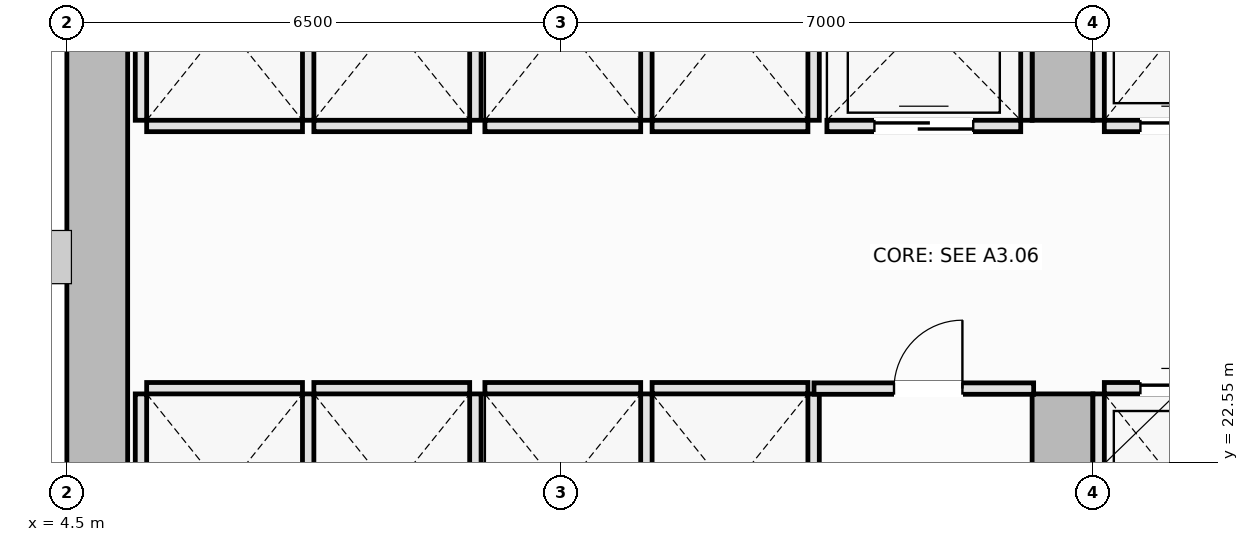
"""IFC4 building model, lengths in metres.
Left out: names, types, materials, properties, quantities, classifications, styles, units other than length and angle.
Written with IfcOpenShell. Run it as: python <this file> out.ifc"""

import sys

from ifc_helpers import new_model, si_unit, direction, frame, frame_2d, origin, place, context, subcontext, project, spatial, rectangle, extrude, element, fill, save


model = new_model("IFC4")
c1 = context("Model", 3, precision=1e-05, world=origin(), true_north=direction((0.0, 1.0)))
c2 = subcontext(c1, "Body", "Model", "MODEL_VIEW")
j1 = project(units=[si_unit("LENGTHUNIT", "METRE"), si_unit("PLANEANGLEUNIT", "RADIAN")], contexts=[c1])
p1 = place(None, origin())
s1 = spatial("IfcSite", under=j1, at=p1, CompositionType="ELEMENT")
p2 = place(p1, origin())
s2 = spatial("IfcBuilding", under=s1, at=p2, CompositionType="ELEMENT")
p3 = place(p2, frame((0.0, 0.0, 61.1)))
s3 = spatial("IfcBuildingStorey", under=s2, at=p3, CompositionType="ELEMENT", Elevation=61.1)
p4 = place(p3, frame((4.9, 14.8, 0.0), z_axis=(0.0, 0.0, 1.0), x_axis=(0.0, 1.0, 0.0)))
e1 = element("IfcWall", 1, at=p4, inside=s3, PredefinedType="SHEAR", context=c2, shape_type="SweptSolid", body=[
    extrude(rectangle(XDim=20.9, YDim=0.8, at=frame_2d((10.45, 0.0))), origin(), (0.0, 0.0, 1.0), 3.55),
])
p5 = place(p3, frame((17.6, 14.8, 0.0), z_axis=(0.0, 0.0, 1.0), x_axis=(0.0, 1.0, 0.0)))
e2 = element("IfcWall", 2, at=p5, inside=s3, PredefinedType="SHEAR", context=c2, shape_type="SweptSolid", body=[
    extrude(rectangle(XDim=8.65, YDim=0.8, at=frame_2d((4.325, 0.0))), origin(), (0.0, 0.0, 1.0), 3.55),
])
p6 = place(p5, frame((4.1, 0.0, 0.0)))
e3 = element("IfcOpeningElement", 3, at=p6, cuts=e2, PredefinedType="OPENING", context=c2, shape_type="SweptSolid", body=[
    extrude(rectangle(XDim=1.1, YDim=2.15, at=frame_2d((0.55, 1.075))), frame((0.0, 0.41, 0.0), z_axis=(0.0, -1.0, 0.0), x_axis=(1.0, 0.0, 0.0)), (0.0, 0.0, 1.0), 0.82),
])
p7 = place(p3, frame((17.6, 27.05, 0.0), z_axis=(0.0, 0.0, 1.0), x_axis=(0.0, 1.0, 0.0)))
e4 = element("IfcWall", 4, at=p7, inside=s3, PredefinedType="SHEAR", context=c2, shape_type="SweptSolid", body=[
    extrude(rectangle(XDim=8.65, YDim=0.8, at=frame_2d((4.325, 0.0))), origin(), (0.0, 0.0, 1.0), 3.55),
])
p8 = place(p7, frame((3.45, 0.0, 0.0)))
e5 = element("IfcOpeningElement", 5, at=p8, cuts=e4, PredefinedType="OPENING", context=c2, shape_type="SweptSolid", body=[
    extrude(rectangle(XDim=1.1, YDim=2.15, at=frame_2d((0.55, 1.075))), frame((0.0, 0.41, 0.0), z_axis=(0.0, -1.0, 0.0), x_axis=(1.0, 0.0, 0.0)), (0.0, 0.0, 1.0), 0.82),
])
p9 = place(p3, frame((18.15, 23.525, 0.0), z_axis=(0.0, 0.0, 1.0), x_axis=(1.0, 0.0, 0.0)))
e6 = element("IfcWall", 6, at=p9, inside=s3, PredefinedType="PARTITIONING", context=c2, shape_type="SweptSolid", body=[
    extrude(rectangle(XDim=2.05, YDim=0.15, at=frame_2d((1.025, 0.0))), origin(), (0.0, 0.0, 1.0), 3.37),
])
p10 = place(p9, frame((0.475, 0.0, 0.0)))
e7 = element("IfcOpeningElement", 7, at=p10, cuts=e6, PredefinedType="OPENING", context=c2, shape_type="SweptSolid", body=[
    extrude(rectangle(XDim=1.1, YDim=2.2, at=frame_2d((0.55, 1.1))), frame((0.0, 0.085, 0.0), z_axis=(0.0, -1.0, 0.0), x_axis=(1.0, 0.0, 0.0)), (0.0, 0.0, 1.0), 0.17),
])
p11 = place(p3, frame((18.075, 20.9, 0.0), z_axis=(0.0, 0.0, 1.0), x_axis=(0.0, 1.0, 0.0)))
e8 = element("IfcWall", 8, at=p11, inside=s3, PredefinedType="PARTITIONING", context=c2, shape_type="SweptSolid", body=[
    extrude(rectangle(XDim=2.55, YDim=0.15, at=frame_2d((1.275, 0.0))), origin(), (0.0, 0.0, 1.0), 3.37),
])
p12 = place(p3, frame((18.15, 26.975, 0.0), z_axis=(0.0, 0.0, 1.0), x_axis=(1.0, 0.0, 0.0)))
e9 = element("IfcWall", 9, at=p12, inside=s3, PredefinedType="PARTITIONING", context=c2, shape_type="SweptSolid", body=[
    extrude(rectangle(XDim=2.05, YDim=0.15, at=frame_2d((1.025, 0.0))), origin(), (0.0, 0.0, 1.0), 3.37),
])
p13 = place(p12, frame((0.475, 0.0, 0.0)))
e10 = element("IfcOpeningElement", 10, at=p13, cuts=e9, PredefinedType="OPENING", context=c2, shape_type="SweptSolid", body=[
    extrude(rectangle(XDim=1.1, YDim=2.2, at=frame_2d((0.55, 1.1))), frame((0.0, 0.085, 0.0), z_axis=(0.0, -1.0, 0.0), x_axis=(1.0, 0.0, 0.0)), (0.0, 0.0, 1.0), 0.17),
])
p14 = place(p3, frame((18.075, 27.05, 0.0), z_axis=(0.0, 0.0, 1.0), x_axis=(0.0, 1.0, 0.0)))
e11 = element("IfcWall", 11, at=p14, inside=s3, PredefinedType="PARTITIONING", context=c2, shape_type="SweptSolid", body=[
    extrude(rectangle(XDim=2.55, YDim=0.15, at=frame_2d((1.275, 0.0))), origin(), (0.0, 0.0, 1.0), 3.37),
])
p15 = place(p3, frame((5.55, 23.525, 0.0), z_axis=(0.0, 0.0, 1.0), x_axis=(1.0, 0.0, 0.0)))
e12 = element("IfcWall", 12, at=p15, inside=s3, PredefinedType="PARTITIONING", context=c2, shape_type="SweptSolid", body=[
    extrude(rectangle(XDim=2.05, YDim=0.15, at=frame_2d((1.025, 0.0))), origin(), (0.0, 0.0, 1.0), 3.37),
])
for number, where, z_axis, x_axis in (
    (13, (5.475, 20.9, 0.0), (0.0, 0.0, 1.0), (0.0, 1.0, 0.0)),
    (14, (7.675, 20.9, 0.0), (0.0, 0.0, 1.0), (0.0, 1.0, 0.0)),
):
    element("IfcWall", number, at=place(p3, frame(where, z_axis=z_axis, x_axis=x_axis)), inside=s3, PredefinedType="PARTITIONING", context=c2, shape_type="SweptSolid", body=[
        extrude(rectangle(XDim=2.55, YDim=0.15, at=frame_2d((1.275, 0.0))), origin(), (0.0, 0.0, 1.0), 3.37),
    ])
p16 = place(p3, frame((7.75, 23.525, 0.0), z_axis=(0.0, 0.0, 1.0), x_axis=(1.0, 0.0, 0.0)))
e15 = element("IfcWall", 15, at=p16, inside=s3, PredefinedType="PARTITIONING", context=c2, shape_type="SweptSolid", body=[
    extrude(rectangle(XDim=2.05, YDim=0.15, at=frame_2d((1.025, 0.0))), origin(), (0.0, 0.0, 1.0), 3.37),
])
p17 = place(p3, frame((9.875, 20.9, 0.0), z_axis=(0.0, 0.0, 1.0), x_axis=(0.0, 1.0, 0.0)))
e16 = element("IfcWall", 16, at=p17, inside=s3, PredefinedType="PARTITIONING", context=c2, shape_type="SweptSolid", body=[
    extrude(rectangle(XDim=2.55, YDim=0.15, at=frame_2d((1.275, 0.0))), origin(), (0.0, 0.0, 1.0), 3.37),
])
p18 = place(p3, frame((5.55, 26.975, 0.0), z_axis=(0.0, 0.0, 1.0), x_axis=(1.0, 0.0, 0.0)))
e17 = element("IfcWall", 17, at=p18, inside=s3, PredefinedType="PARTITIONING", context=c2, shape_type="SweptSolid", body=[
    extrude(rectangle(XDim=2.05, YDim=0.15, at=frame_2d((1.025, 0.0))), origin(), (0.0, 0.0, 1.0), 3.37),
])
for number, where, z_axis, x_axis in (
    (18, (5.475, 27.05, 0.0), (0.0, 0.0, 1.0), (0.0, 1.0, 0.0)),
    (19, (7.675, 27.05, 0.0), (0.0, 0.0, 1.0), (0.0, 1.0, 0.0)),
):
    element("IfcWall", number, at=place(p3, frame(where, z_axis=z_axis, x_axis=x_axis)), inside=s3, PredefinedType="PARTITIONING", context=c2, shape_type="SweptSolid", body=[
        extrude(rectangle(XDim=2.55, YDim=0.15, at=frame_2d((1.275, 0.0))), origin(), (0.0, 0.0, 1.0), 3.37),
    ])
p19 = place(p3, frame((7.75, 26.975, 0.0), z_axis=(0.0, 0.0, 1.0), x_axis=(1.0, 0.0, 0.0)))
e20 = element("IfcWall", 20, at=p19, inside=s3, PredefinedType="PARTITIONING", context=c2, shape_type="SweptSolid", body=[
    extrude(rectangle(XDim=2.05, YDim=0.15, at=frame_2d((1.025, 0.0))), origin(), (0.0, 0.0, 1.0), 3.37),
])
p20 = place(p3, frame((9.875, 27.05, 0.0), z_axis=(0.0, 0.0, 1.0), x_axis=(0.0, 1.0, 0.0)))
e21 = element("IfcWall", 21, at=p20, inside=s3, PredefinedType="PARTITIONING", context=c2, shape_type="SweptSolid", body=[
    extrude(rectangle(XDim=2.55, YDim=0.15, at=frame_2d((1.275, 0.0))), origin(), (0.0, 0.0, 1.0), 3.37),
])
p21 = place(p3, frame((10.0, 23.525, 0.0), z_axis=(0.0, 0.0, 1.0), x_axis=(1.0, 0.0, 0.0)))
e22 = element("IfcWall", 22, at=p21, inside=s3, PredefinedType="PARTITIONING", context=c2, shape_type="SweptSolid", body=[
    extrude(rectangle(XDim=2.05, YDim=0.15, at=frame_2d((1.025, 0.0))), origin(), (0.0, 0.0, 1.0), 3.37),
])
p22 = place(p3, frame((12.125, 20.9, 0.0), z_axis=(0.0, 0.0, 1.0), x_axis=(0.0, 1.0, 0.0)))
e23 = element("IfcWall", 23, at=p22, inside=s3, PredefinedType="PARTITIONING", context=c2, shape_type="SweptSolid", body=[
    extrude(rectangle(XDim=2.55, YDim=0.15, at=frame_2d((1.275, 0.0))), origin(), (0.0, 0.0, 1.0), 3.37),
])
p23 = place(p3, frame((12.2, 23.525, 0.0), z_axis=(0.0, 0.0, 1.0), x_axis=(1.0, 0.0, 0.0)))
e24 = element("IfcWall", 24, at=p23, inside=s3, PredefinedType="PARTITIONING", context=c2, shape_type="SweptSolid", body=[
    extrude(rectangle(XDim=2.05, YDim=0.15, at=frame_2d((1.025, 0.0))), origin(), (0.0, 0.0, 1.0), 3.37),
])
p24 = place(p3, frame((14.325, 20.9, 0.0), z_axis=(0.0, 0.0, 1.0), x_axis=(0.0, 1.0, 0.0)))
e25 = element("IfcWall", 25, at=p24, inside=s3, PredefinedType="PARTITIONING", context=c2, shape_type="SweptSolid", body=[
    extrude(rectangle(XDim=2.55, YDim=0.15, at=frame_2d((1.275, 0.0))), origin(), (0.0, 0.0, 1.0), 3.37),
])
p25 = place(p3, frame((10.0, 26.975, 0.0), z_axis=(0.0, 0.0, 1.0), x_axis=(1.0, 0.0, 0.0)))
e26 = element("IfcWall", 26, at=p25, inside=s3, PredefinedType="PARTITIONING", context=c2, shape_type="SweptSolid", body=[
    extrude(rectangle(XDim=2.05, YDim=0.15, at=frame_2d((1.025, 0.0))), origin(), (0.0, 0.0, 1.0), 3.37),
])
p26 = place(p3, frame((12.125, 27.05, 0.0), z_axis=(0.0, 0.0, 1.0), x_axis=(0.0, 1.0, 0.0)))
e27 = element("IfcWall", 27, at=p26, inside=s3, PredefinedType="PARTITIONING", context=c2, shape_type="SweptSolid", body=[
    extrude(rectangle(XDim=2.55, YDim=0.15, at=frame_2d((1.275, 0.0))), origin(), (0.0, 0.0, 1.0), 3.37),
])
p27 = place(p3, frame((12.2, 26.975, 0.0), z_axis=(0.0, 0.0, 1.0), x_axis=(1.0, 0.0, 0.0)))
e28 = element("IfcWall", 28, at=p27, inside=s3, PredefinedType="PARTITIONING", context=c2, shape_type="SweptSolid", body=[
    extrude(rectangle(XDim=2.05, YDim=0.15, at=frame_2d((1.025, 0.0))), origin(), (0.0, 0.0, 1.0), 3.37),
])
p28 = place(p3, frame((14.325, 27.05, 0.0), z_axis=(0.0, 0.0, 1.0), x_axis=(0.0, 1.0, 0.0)))
e29 = element("IfcWall", 29, at=p28, inside=s3, PredefinedType="PARTITIONING", context=c2, shape_type="SweptSolid", body=[
    extrude(rectangle(XDim=2.55, YDim=0.15, at=frame_2d((1.275, 0.0))), origin(), (0.0, 0.0, 1.0), 3.37),
])
p29 = place(p3, frame((14.5, 26.975, 0.0), z_axis=(0.0, 0.0, 1.0), x_axis=(1.0, 0.0, 0.0)))
e30 = element("IfcWall", 30, at=p29, inside=s3, PredefinedType="PARTITIONING", context=c2, shape_type="SweptSolid", body=[
    extrude(rectangle(XDim=2.55, YDim=0.15, at=frame_2d((1.275, 0.0))), origin(), (0.0, 0.0, 1.0), 3.37),
])
p30 = place(p29, frame((0.625, 0.0, 0.0)))
e31 = element("IfcOpeningElement", 31, at=p30, cuts=e30, PredefinedType="OPENING", context=c2, shape_type="SweptSolid", body=[
    extrude(rectangle(XDim=1.3, YDim=2.2, at=frame_2d((0.65, 1.1))), frame((0.0, 0.085, 0.0), z_axis=(0.0, -1.0, 0.0), x_axis=(1.0, 0.0, 0.0)), (0.0, 0.0, 1.0), 0.17),
])
p31 = place(p3, frame((17.125, 27.05, 0.0), z_axis=(0.0, 0.0, 1.0), x_axis=(0.0, 1.0, 0.0)))
e32 = element("IfcWall", 32, at=p31, inside=s3, PredefinedType="PARTITIONING", context=c2, shape_type="SweptSolid", body=[
    extrude(rectangle(XDim=2.6, YDim=0.15, at=frame_2d((1.3, 0.0))), origin(), (0.0, 0.0, 1.0), 3.37),
])
p32 = place(p3, frame((14.33, 23.52, 0.0), z_axis=(0.0, 0.0, 1.0), x_axis=(1.0, 0.0, 0.0)))
e33 = element("IfcWall", 33, at=p32, inside=s3, PredefinedType="PARTITIONING", context=c2, shape_type="SweptSolid", body=[
    extrude(rectangle(XDim=2.89, YDim=0.15, at=frame_2d((1.445, 0.0))), origin(), (0.0, 0.0, 1.0), 3.37),
])
p33 = place(p32, frame((1.053, 0.0, 0.0)))
e34 = element("IfcOpeningElement", 34, at=p33, cuts=e33, PredefinedType="OPENING", context=c2, shape_type="SweptSolid", body=[
    extrude(rectangle(XDim=0.9, YDim=2.1, at=frame_2d((0.45, 1.05))), frame((0.0, 0.085, 0.0), z_axis=(0.0, -1.0, 0.0), x_axis=(1.0, 0.0, 0.0)), (0.0, 0.0, 1.0), 0.17),
])
p34 = place(p10, origin())
e35 = element("IfcDoor", 35, at=p34, inside=s3, OperationType="DOUBLE_DOOR_SLIDING", PredefinedType="DOOR", context=c2, shape_type="SweptSolid", body=[
    extrude(rectangle(XDim=1.1, YDim=2.2, at=frame_2d((0.55, 1.1))), frame((0.0, 0.025, 0.0), z_axis=(0.0, -1.0, 0.0), x_axis=(1.0, 0.0, 0.0)), (0.0, 0.0, 1.0), 0.05),
])
fill(e7, e35)
p35 = place(p13, origin())
e36 = element("IfcDoor", 36, at=p35, inside=s3, OperationType="DOUBLE_DOOR_SLIDING", PredefinedType="DOOR", context=c2, shape_type="SweptSolid", body=[
    extrude(rectangle(XDim=1.1, YDim=2.2, at=frame_2d((0.55, 1.1))), frame((0.0, 0.025, 0.0), z_axis=(0.0, -1.0, 0.0), x_axis=(1.0, 0.0, 0.0)), (0.0, 0.0, 1.0), 0.05),
])
fill(e10, e36)
p36 = place(p30, origin())
e37 = element("IfcDoor", 37, at=p36, inside=s3, OperationType="DOUBLE_DOOR_SLIDING", PredefinedType="DOOR", context=c2, shape_type="SweptSolid", body=[
    extrude(rectangle(XDim=1.3, YDim=2.2, at=frame_2d((0.65, 1.1))), frame((0.0, 0.025, 0.0), z_axis=(0.0, -1.0, 0.0), x_axis=(1.0, 0.0, 0.0)), (0.0, 0.0, 1.0), 0.05),
])
fill(e31, e37)
p37 = place(p33, origin())
e38 = element("IfcDoor", 38, at=p37, inside=s3, OperationType="SINGLE_SWING_RIGHT", PredefinedType="DOOR", context=c2, shape_type="SweptSolid", body=[
    extrude(rectangle(XDim=0.9, YDim=2.1, at=frame_2d((0.45, 1.05))), frame((0.0, 0.025, 0.0), z_axis=(0.0, -1.0, 0.0), x_axis=(1.0, 0.0, 0.0)), (0.0, 0.0, 1.0), 0.05),
])
fill(e34, e38)
save(model, sys.argv[1])
